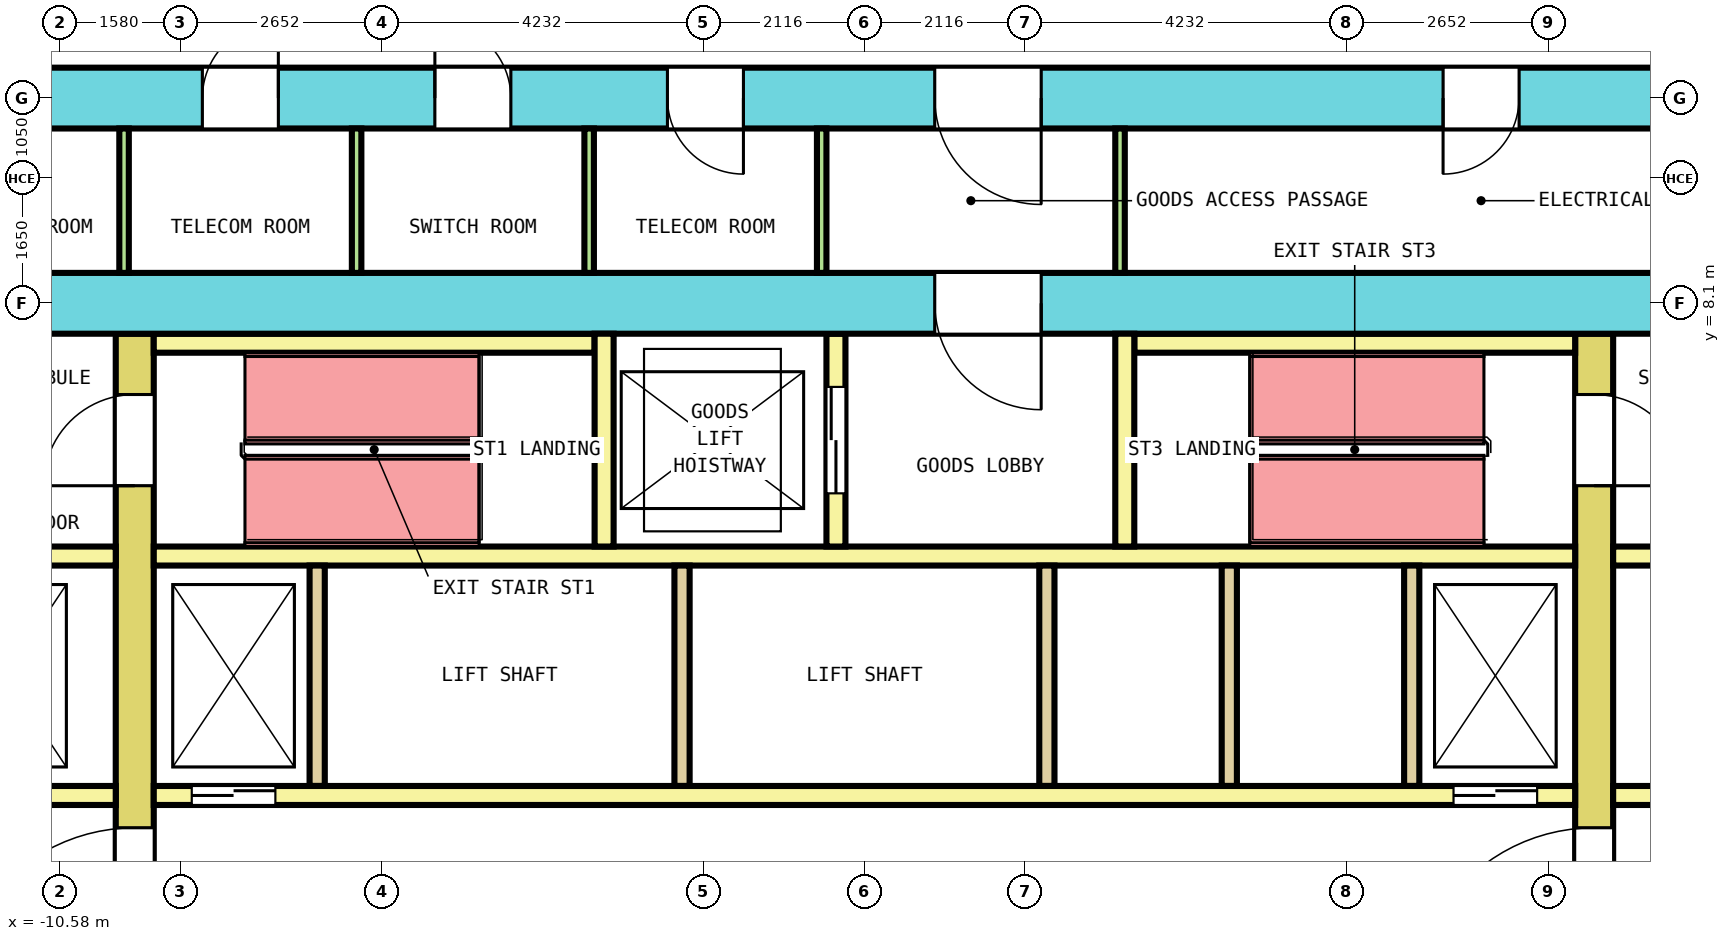
"""IFC4 building model, lengths in metres.
Left out: names, types, materials, properties, quantities, classifications, styles, units other than length and angle.
Written with IfcOpenShell. Run it as: python <this file> out.ifc"""

import sys

from ifc_helpers import new_model, si_unit, direction, frame, frame_2d, origin, place, context, subcontext, project, spatial, rectangle, extrude, element, fill, save


model = new_model("IFC4")
c1 = context("Model", 3, precision=1e-05, world=origin(), true_north=direction((0.0, 1.0)))
c2 = subcontext(c1, "Body", "Model", "MODEL_VIEW")
j1 = project(units=[si_unit("LENGTHUNIT", "METRE"), si_unit("PLANEANGLEUNIT", "RADIAN")], contexts=[c1])
p1 = place(None, origin())
s1 = spatial("IfcSite", under=j1, at=p1, CompositionType="ELEMENT")
p2 = place(p1, origin())
s2 = spatial("IfcBuilding", under=s1, at=p2, CompositionType="ELEMENT")
p3 = place(p2, frame((0.0, 0.0, 80.8)))
s3 = spatial("IfcBuildingStorey", under=s2, at=p3, CompositionType="ELEMENT", Elevation=80.8)
p4 = place(p3, frame((-13.6, 10.8, 0.0), z_axis=(0.0, 0.0, 1.0), x_axis=(1.0, 0.0, 0.0)))
e1 = element("IfcWall", 1, at=p4, inside=s3, PredefinedType="SHEAR", context=c2, shape_type="SweptSolid", body=[
    extrude(rectangle(XDim=27.2, YDim=0.8, at=frame_2d((13.6, 0.0))), origin(), (0.0, 0.0, 1.0), 4.1),
])
p5 = place(p4, frame((1.798, 0.0, 0.0)))
e2 = element("IfcOpeningElement", 2, at=p5, cuts=e1, PredefinedType="OPENING", context=c2, shape_type="SweptSolid", body=[
    extrude(rectangle(XDim=1.0, YDim=2.1, at=frame_2d((0.5, 1.05))), frame((0.0, 0.41, 0.0), z_axis=(0.0, -1.0, 0.0), x_axis=(1.0, 0.0, 0.0)), (0.0, 0.0, 1.0), 0.82),
])
p6 = place(p4, frame((4.889, 0.0, 0.0)))
e3 = element("IfcOpeningElement", 3, at=p6, cuts=e1, PredefinedType="OPENING", context=c2, shape_type="SweptSolid", body=[
    extrude(rectangle(XDim=1.0, YDim=2.1, at=frame_2d((0.5, 1.05))), frame((0.0, 0.41, 0.0), z_axis=(0.0, -1.0, 0.0), x_axis=(1.0, 0.0, 0.0)), (0.0, 0.0, 1.0), 0.82),
])
p7 = place(p4, frame((7.948, 0.0, 0.0)))
e4 = element("IfcOpeningElement", 4, at=p7, cuts=e1, PredefinedType="OPENING", context=c2, shape_type="SweptSolid", body=[
    extrude(rectangle(XDim=1.0, YDim=2.1, at=frame_2d((0.5, 1.05))), frame((0.0, 0.41, 0.0), z_axis=(0.0, -1.0, 0.0), x_axis=(1.0, 0.0, 0.0)), (0.0, 0.0, 1.0), 0.82),
])
p8 = place(p4, frame((11.008, 0.0, 0.0)))
e5 = element("IfcOpeningElement", 5, at=p8, cuts=e1, PredefinedType="OPENING", context=c2, shape_type="SweptSolid", body=[
    extrude(rectangle(XDim=1.0, YDim=2.1, at=frame_2d((0.5, 1.05))), frame((0.0, 0.41, 0.0), z_axis=(0.0, -1.0, 0.0), x_axis=(1.0, 0.0, 0.0)), (0.0, 0.0, 1.0), 0.82),
])
p9 = place(p4, frame((21.212, 0.0, 0.0)))
e6 = element("IfcOpeningElement", 6, at=p9, cuts=e1, PredefinedType="OPENING", context=c2, shape_type="SweptSolid", body=[
    extrude(rectangle(XDim=1.0, YDim=2.1, at=frame_2d((0.5, 1.05))), frame((0.0, 0.41, 0.0), z_axis=(0.0, -1.0, 0.0), x_axis=(1.0, 0.0, 0.0)), (0.0, 0.0, 1.0), 0.82),
])
p10 = place(p4, frame((14.525, 0.0, 0.0)))
e7 = element("IfcOpeningElement", 7, at=p10, cuts=e1, PredefinedType="OPENING", context=c2, shape_type="SweptSolid", body=[
    extrude(rectangle(XDim=1.4, YDim=2.1, at=frame_2d((0.7, 1.05))), frame((0.0, 0.41, 0.0), z_axis=(0.0, -1.0, 0.0), x_axis=(1.0, 0.0, 0.0)), (0.0, 0.0, 1.0), 0.82),
])
p11 = place(p3, frame((-12.8, 8.1, 0.0), z_axis=(0.0, 0.0, 1.0), x_axis=(1.0, 0.0, 0.0)))
e8 = element("IfcWall", 8, at=p11, inside=s3, PredefinedType="SHEAR", context=c2, shape_type="SweptSolid", body=[
    extrude(rectangle(XDim=25.6, YDim=0.8, at=frame_2d((12.8, 0.0))), origin(), (0.0, 0.0, 1.0), 4.1),
])
p12 = place(p11, frame((13.725, 0.0, 0.0)))
e9 = element("IfcOpeningElement", 9, at=p12, cuts=e8, PredefinedType="OPENING", context=c2, shape_type="SweptSolid", body=[
    extrude(rectangle(XDim=1.4, YDim=2.1, at=frame_2d((0.7, 1.05))), frame((0.0, 0.41, 0.0), z_axis=(0.0, -1.0, 0.0), x_axis=(1.0, 0.0, 0.0)), (0.0, 0.0, 1.0), 0.82),
])
p13 = place(p3, frame((-9.6, -7.7, 0.0), z_axis=(0.0, 0.0, 1.0), x_axis=(0.0, 1.0, 0.0)))
e10 = element("IfcWall", 10, at=p13, inside=s3, PredefinedType="SHEAR", context=c2, shape_type="SweptSolid", body=[
    extrude(rectangle(XDim=15.4, YDim=0.5, at=frame_2d((7.7, 0.0))), origin(), (0.0, 0.0, 1.0), 4.1),
])
p14 = place(p13, frame((6.5, 0.0, 0.0)))
e11 = element("IfcOpeningElement", 11, at=p14, cuts=e10, PredefinedType="OPENING", context=c2, shape_type="SweptSolid", body=[
    extrude(rectangle(XDim=2.4, YDim=2.1, at=frame_2d((1.2, 1.05))), frame((0.0, 0.26, 0.0), z_axis=(0.0, -1.0, 0.0), x_axis=(1.0, 0.0, 0.0)), (0.0, 0.0, 1.0), 0.52),
])
p15 = place(p13, frame((13.4, 0.0, 0.0)))
e12 = element("IfcOpeningElement", 12, at=p15, cuts=e10, PredefinedType="OPENING", context=c2, shape_type="SweptSolid", body=[
    extrude(rectangle(XDim=1.2, YDim=2.1, at=frame_2d((0.6, 1.05))), frame((0.0, 0.26, 0.0), z_axis=(0.0, -1.0, 0.0), x_axis=(1.0, 0.0, 0.0)), (0.0, 0.0, 1.0), 0.52),
])
p16 = place(p13, frame((0.8, 0.0, 0.0)))
e13 = element("IfcOpeningElement", 13, at=p16, cuts=e10, PredefinedType="OPENING", context=c2, shape_type="SweptSolid", body=[
    extrude(rectangle(XDim=1.2, YDim=2.1, at=frame_2d((0.6, 1.05))), frame((0.0, 0.26, 0.0), z_axis=(0.0, -1.0, 0.0), x_axis=(1.0, 0.0, 0.0)), (0.0, 0.0, 1.0), 0.52),
])
p17 = place(p3, frame((9.6, -7.7, 0.0), z_axis=(0.0, 0.0, 1.0), x_axis=(0.0, 1.0, 0.0)))
e14 = element("IfcWall", 14, at=p17, inside=s3, PredefinedType="SHEAR", context=c2, shape_type="SweptSolid", body=[
    extrude(rectangle(XDim=15.4, YDim=0.5, at=frame_2d((7.7, 0.0))), origin(), (0.0, 0.0, 1.0), 4.1),
])
p18 = place(p17, frame((6.5, 0.0, 0.0)))
e15 = element("IfcOpeningElement", 15, at=p18, cuts=e14, PredefinedType="OPENING", context=c2, shape_type="SweptSolid", body=[
    extrude(rectangle(XDim=2.4, YDim=2.1, at=frame_2d((1.2, 1.05))), frame((0.0, 0.26, 0.0), z_axis=(0.0, -1.0, 0.0), x_axis=(1.0, 0.0, 0.0)), (0.0, 0.0, 1.0), 0.52),
])
p19 = place(p17, frame((13.4, 0.0, 0.0)))
e16 = element("IfcOpeningElement", 16, at=p19, cuts=e14, PredefinedType="OPENING", context=c2, shape_type="SweptSolid", body=[
    extrude(rectangle(XDim=1.2, YDim=2.1, at=frame_2d((0.6, 1.05))), frame((0.0, 0.26, 0.0), z_axis=(0.0, -1.0, 0.0), x_axis=(1.0, 0.0, 0.0)), (0.0, 0.0, 1.0), 0.52),
])
p20 = place(p17, frame((0.9, 0.0, 0.0)))
e17 = element("IfcOpeningElement", 17, at=p20, cuts=e14, PredefinedType="OPENING", context=c2, shape_type="SweptSolid", body=[
    extrude(rectangle(XDim=1.0, YDim=2.1, at=frame_2d((0.5, 1.05))), frame((0.0, 0.26, 0.0), z_axis=(0.0, -1.0, 0.0), x_axis=(1.0, 0.0, 0.0)), (0.0, 0.0, 1.0), 0.52),
])
p21 = place(p3, frame((-12.8, 1.625, 0.0), z_axis=(0.0, 0.0, 1.0), x_axis=(1.0, 0.0, 0.0)))
e18 = element("IfcWall", 18, at=p21, inside=s3, PredefinedType="SOLIDWALL", context=c2, shape_type="SweptSolid", body=[
    extrude(rectangle(XDim=2.95, YDim=0.25, at=frame_2d((1.475, 0.0))), origin(), (0.0, 0.0, 1.0), 4.1),
])
p22 = place(p21, frame((0.925, 0.0, 0.0)))
e19 = element("IfcOpeningElement", 19, at=p22, cuts=e18, PredefinedType="OPENING", context=c2, shape_type="SweptSolid", body=[
    extrude(rectangle(XDim=1.1, YDim=2.1, at=frame_2d((0.55, 1.05))), frame((0.0, 0.135, 0.0), z_axis=(0.0, -1.0, 0.0), x_axis=(1.0, 0.0, 0.0)), (0.0, 0.0, 1.0), 0.27),
])
p23 = place(p3, frame((-9.35, 1.625, 0.0), z_axis=(0.0, 0.0, 1.0), x_axis=(1.0, 0.0, 0.0)))
e20 = element("IfcWall", 20, at=p23, inside=s3, PredefinedType="SOLIDWALL", context=c2, shape_type="SweptSolid", body=[
    extrude(rectangle(XDim=18.7, YDim=0.25, at=frame_2d((9.35, 0.0))), origin(), (0.0, 0.0, 1.0), 4.1),
])
p24 = place(p23, frame((0.5, 0.0, 0.0)))
e21 = element("IfcOpeningElement", 21, at=p24, cuts=e20, PredefinedType="OPENING", context=c2, shape_type="SweptSolid", body=[
    extrude(rectangle(XDim=1.1, YDim=2.1, at=frame_2d((0.55, 1.05))), frame((0.0, 0.135, 0.0), z_axis=(0.0, -1.0, 0.0), x_axis=(1.0, 0.0, 0.0)), (0.0, 0.0, 1.0), 0.27),
])
p25 = place(p23, frame((17.1, 0.0, 0.0)))
e22 = element("IfcOpeningElement", 22, at=p25, cuts=e20, PredefinedType="OPENING", context=c2, shape_type="SweptSolid", body=[
    extrude(rectangle(XDim=1.1, YDim=2.1, at=frame_2d((0.55, 1.05))), frame((0.0, 0.135, 0.0), z_axis=(0.0, -1.0, 0.0), x_axis=(1.0, 0.0, 0.0)), (0.0, 0.0, 1.0), 0.27),
])
p26 = place(p3, frame((9.85, 1.625, 0.0), z_axis=(0.0, 0.0, 1.0), x_axis=(1.0, 0.0, 0.0)))
e23 = element("IfcWall", 23, at=p26, inside=s3, PredefinedType="SOLIDWALL", context=c2, shape_type="SweptSolid", body=[
    extrude(rectangle(XDim=2.95, YDim=0.25, at=frame_2d((1.475, 0.0))), origin(), (0.0, 0.0, 1.0), 4.1),
])
p27 = place(p26, frame((0.925, 0.0, 0.0)))
e24 = element("IfcOpeningElement", 24, at=p27, cuts=e23, PredefinedType="OPENING", context=c2, shape_type="SweptSolid", body=[
    extrude(rectangle(XDim=1.1, YDim=2.1, at=frame_2d((0.55, 1.05))), frame((0.0, 0.135, 0.0), z_axis=(0.0, -1.0, 0.0), x_axis=(1.0, 0.0, 0.0)), (0.0, 0.0, 1.0), 0.27),
])
p28 = place(p3, frame((-12.8, 4.775, 0.0), z_axis=(0.0, 0.0, 1.0), x_axis=(1.0, 0.0, 0.0)))
e25 = element("IfcWall", 25, at=p28, inside=s3, PredefinedType="SOLIDWALL", context=c2, shape_type="SweptSolid", body=[
    extrude(rectangle(XDim=2.95, YDim=0.25, at=frame_2d((1.475, 0.0))), origin(), (0.0, 0.0, 1.0), 4.1),
])
p29 = place(p3, frame((-9.35, 4.775, 0.0), z_axis=(0.0, 0.0, 1.0), x_axis=(1.0, 0.0, 0.0)))
e26 = element("IfcWall", 26, at=p29, inside=s3, PredefinedType="SOLIDWALL", context=c2, shape_type="SweptSolid", body=[
    extrude(rectangle(XDim=18.7, YDim=0.25, at=frame_2d((9.35, 0.0))), origin(), (0.0, 0.0, 1.0), 4.1),
])
p30 = place(p3, frame((9.85, 4.775, 0.0), z_axis=(0.0, 0.0, 1.0), x_axis=(1.0, 0.0, 0.0)))
e27 = element("IfcWall", 27, at=p30, inside=s3, PredefinedType="SOLIDWALL", context=c2, shape_type="SweptSolid", body=[
    extrude(rectangle(XDim=2.95, YDim=0.25, at=frame_2d((1.475, 0.0))), origin(), (0.0, 0.0, 1.0), 4.1),
])
for number, where, z_axis, x_axis in (
    (28, (-7.2, 1.75, 0.0), (0.0, 0.0, 1.0), (0.0, 1.0, 0.0)),
    (29, (-2.4, 1.75, 0.0), (0.0, 0.0, 1.0), (0.0, 1.0, 0.0)),
    (30, (2.4, 1.75, 0.0), (0.0, 0.0, 1.0), (0.0, 1.0, 0.0)),
    (31, (4.8, 1.75, 0.0), (0.0, 0.0, 1.0), (0.0, 1.0, 0.0)),
    (32, (7.2, 1.75, 0.0), (0.0, 0.0, 1.0), (0.0, 1.0, 0.0)),
):
    element("IfcWall", number, at=place(p3, frame(where, z_axis=z_axis, x_axis=x_axis)), inside=s3, PredefinedType="SOLIDWALL", context=c2, shape_type="SweptSolid", body=[
        extrude(rectangle(XDim=2.9, YDim=0.2, at=frame_2d((1.45, 0.0))), origin(), (0.0, 0.0, 1.0), 4.1),
    ])
for number, where, z_axis, x_axis in (
    (33, (-9.35, 7.575, 0.0), (0.0, 0.0, 1.0), (1.0, 0.0, 0.0)),
    (34, (3.55, 7.575, 0.0), (0.0, 0.0, 1.0), (1.0, 0.0, 0.0)),
):
    element("IfcWall", number, at=place(p3, frame(where, z_axis=z_axis, x_axis=x_axis)), inside=s3, PredefinedType="SOLIDWALL", context=c2, shape_type="SweptSolid", body=[
        extrude(rectangle(XDim=5.8, YDim=0.25, at=frame_2d((2.9, 0.0))), origin(), (0.0, 0.0, 1.0), 4.1),
    ])
p31 = place(p3, frame((-3.425, 4.9, 0.0), z_axis=(0.0, 0.0, 1.0), x_axis=(0.0, 1.0, 0.0)))
e35 = element("IfcWall", 35, at=p31, inside=s3, PredefinedType="SOLIDWALL", context=c2, shape_type="SweptSolid", body=[
    extrude(rectangle(XDim=2.8, YDim=0.25, at=frame_2d((1.4, 0.0))), origin(), (0.0, 0.0, 1.0), 4.1),
])
p32 = place(p3, frame((-0.375, 4.9, 0.0), z_axis=(0.0, 0.0, 1.0), x_axis=(0.0, 1.0, 0.0)))
e36 = element("IfcWall", 36, at=p32, inside=s3, PredefinedType="SOLIDWALL", context=c2, shape_type="SweptSolid", body=[
    extrude(rectangle(XDim=2.8, YDim=0.25, at=frame_2d((1.4, 0.0))), origin(), (0.0, 0.0, 1.0), 4.1),
])
p33 = place(p32, frame((0.7, 0.0, 0.0)))
e37 = element("IfcOpeningElement", 37, at=p33, cuts=e36, PredefinedType="OPENING", context=c2, shape_type="SweptSolid", body=[
    extrude(rectangle(XDim=1.4, YDim=2.1, at=frame_2d((0.7, 1.05))), frame((0.0, 0.135, 0.0), z_axis=(0.0, -1.0, 0.0), x_axis=(1.0, 0.0, 0.0)), (0.0, 0.0, 1.0), 0.27),
])
p34 = place(p3, frame((3.425, 4.9, 0.0), z_axis=(0.0, 0.0, 1.0), x_axis=(0.0, 1.0, 0.0)))
e38 = element("IfcWall", 38, at=p34, inside=s3, PredefinedType="SOLIDWALL", context=c2, shape_type="SweptSolid", body=[
    extrude(rectangle(XDim=2.8, YDim=0.25, at=frame_2d((1.4, 0.0))), origin(), (0.0, 0.0, 1.0), 4.1),
])
for number, where, z_axis, x_axis in (
    (39, (-9.74, 8.5, 0.0), (0.0, 0.0, 1.0), (0.0, 1.0, 0.0)),
    (40, (-6.681, 8.5, 0.0), (0.0, 0.0, 1.0), (0.0, 1.0, 0.0)),
    (41, (-3.622, 8.5, 0.0), (0.0, 0.0, 1.0), (0.0, 1.0, 0.0)),
    (42, (-0.562, 8.5, 0.0), (0.0, 0.0, 1.0), (0.0, 1.0, 0.0)),
    (43, (3.363, 8.5, 0.0), (0.0, 0.0, 1.0), (0.0, 1.0, 0.0)),
):
    element("IfcWall", number, at=place(p3, frame(where, z_axis=z_axis, x_axis=x_axis)), inside=s3, PredefinedType="PARTITIONING", context=c2, shape_type="SweptSolid", body=[
        extrude(rectangle(XDim=1.9, YDim=0.125, at=frame_2d((0.95, 0.0))), origin(), (0.0, 0.0, 1.0), 4.1),
    ])
p35 = place(p24, origin())
e44 = element("IfcDoor", 44, at=p35, inside=s3, OperationType="DOUBLE_DOOR_SLIDING", PredefinedType="DOOR", context=c2, shape_type="SweptSolid", body=[
    extrude(rectangle(XDim=1.1, YDim=2.1, at=frame_2d((0.55, 1.05))), frame((0.0, 0.075, 0.0), z_axis=(0.0, -1.0, 0.0), x_axis=(1.0, 0.0, 0.0)), (0.0, 0.0, 1.0), 0.15),
])
fill(e21, e44)
p36 = place(p25, origin())
e45 = element("IfcDoor", 45, at=p36, inside=s3, OperationType="DOUBLE_DOOR_SLIDING", PredefinedType="DOOR", context=c2, shape_type="SweptSolid", body=[
    extrude(rectangle(XDim=1.1, YDim=2.1, at=frame_2d((0.55, 1.05))), frame((0.0, 0.075, 0.0), z_axis=(0.0, -1.0, 0.0), x_axis=(1.0, 0.0, 0.0)), (0.0, 0.0, 1.0), 0.15),
])
fill(e22, e45)
p37 = place(p33, origin())
e46 = element("IfcDoor", 46, at=p37, inside=s3, OperationType="DOUBLE_DOOR_SLIDING", PredefinedType="DOOR", context=c2, shape_type="SweptSolid", body=[
    extrude(rectangle(XDim=1.4, YDim=2.1, at=frame_2d((0.7, 1.05))), frame((0.0, 0.075, 0.0), z_axis=(0.0, -1.0, 0.0), x_axis=(1.0, 0.0, 0.0)), (0.0, 0.0, 1.0), 0.15),
])
fill(e37, e46)
p38 = place(p14, origin())
e47 = element("IfcDoor", 47, at=p38, inside=s3, OperationType="DOUBLE_DOOR_SINGLE_SWING", PredefinedType="DOOR", context=c2, shape_type="SweptSolid", body=[
    extrude(rectangle(XDim=2.4, YDim=2.1, at=frame_2d((1.2, 1.05))), frame((0.0, 0.2, 0.0), z_axis=(0.0, -1.0, 0.0), x_axis=(1.0, 0.0, 0.0)), (0.0, 0.0, 1.0), 0.4),
])
fill(e11, e47)
p39 = place(p18, origin())
e48 = element("IfcDoor", 48, at=p39, inside=s3, OperationType="DOUBLE_DOOR_SINGLE_SWING", PredefinedType="DOOR", context=c2, shape_type="SweptSolid", body=[
    extrude(rectangle(XDim=2.4, YDim=2.1, at=frame_2d((1.2, 1.05))), frame((0.0, 0.2, 0.0), z_axis=(0.0, -1.0, 0.0), x_axis=(1.0, 0.0, 0.0)), (0.0, 0.0, 1.0), 0.4),
])
fill(e15, e48)
p40 = place(p15, origin())
e49 = element("IfcDoor", 49, at=p40, inside=s3, OperationType="SINGLE_SWING_LEFT", PredefinedType="DOOR", context=c2, shape_type="SweptSolid", body=[
    extrude(rectangle(XDim=1.2, YDim=2.1, at=frame_2d((0.6, 1.05))), frame((0.0, 0.2, 0.0), z_axis=(0.0, -1.0, 0.0), x_axis=(1.0, 0.0, 0.0)), (0.0, 0.0, 1.0), 0.4),
])
fill(e12, e49)
p41 = place(p19, origin())
e50 = element("IfcDoor", 50, at=p41, inside=s3, OperationType="SINGLE_SWING_LEFT", PredefinedType="DOOR", context=c2, shape_type="SweptSolid", body=[
    extrude(rectangle(XDim=1.2, YDim=2.1, at=frame_2d((0.6, 1.05))), frame((0.0, 0.2, 0.0), z_axis=(0.0, -1.0, 0.0), x_axis=(1.0, 0.0, 0.0)), (0.0, 0.0, 1.0), 0.4),
])
fill(e16, e50)
p42 = place(p12, origin())
e51 = element("IfcDoor", 51, at=p42, inside=s3, OperationType="DOUBLE_DOOR_SINGLE_SWING", PredefinedType="DOOR", context=c2, shape_type="SweptSolid", body=[
    extrude(rectangle(XDim=1.4, YDim=2.1, at=frame_2d((0.7, 1.05))), frame((0.0, 0.3, 0.0), z_axis=(0.0, -1.0, 0.0), x_axis=(1.0, 0.0, 0.0)), (0.0, 0.0, 1.0), 0.6),
])
fill(e9, e51)
p43 = place(p6, origin())
e52 = element("IfcDoor", 52, at=p43, inside=s3, OperationType="SINGLE_SWING_LEFT", PredefinedType="DOOR", context=c2, shape_type="SweptSolid", body=[
    extrude(rectangle(XDim=1.0, YDim=2.1, at=frame_2d((0.5, 1.05))), frame((0.0, 0.3, 0.0), z_axis=(0.0, -1.0, 0.0), x_axis=(1.0, 0.0, 0.0)), (0.0, 0.0, 1.0), 0.6),
])
fill(e3, e52)
p44 = place(p7, origin())
e53 = element("IfcDoor", 53, at=p44, inside=s3, OperationType="SINGLE_SWING_RIGHT", PredefinedType="DOOR", context=c2, shape_type="SweptSolid", body=[
    extrude(rectangle(XDim=1.0, YDim=2.1, at=frame_2d((0.5, 1.05))), frame((0.0, 0.3, 0.0), z_axis=(0.0, -1.0, 0.0), x_axis=(1.0, 0.0, 0.0)), (0.0, 0.0, 1.0), 0.6),
])
fill(e4, e53)
p45 = place(p8, origin())
e54 = element("IfcDoor", 54, at=p45, inside=s3, OperationType="SINGLE_SWING_LEFT", PredefinedType="DOOR", context=c2, shape_type="SweptSolid", body=[
    extrude(rectangle(XDim=1.0, YDim=2.1, at=frame_2d((0.5, 1.05))), frame((0.0, 0.3, 0.0), z_axis=(0.0, -1.0, 0.0), x_axis=(1.0, 0.0, 0.0)), (0.0, 0.0, 1.0), 0.6),
])
fill(e5, e54)
p46 = place(p9, origin())
e55 = element("IfcDoor", 55, at=p46, inside=s3, OperationType="SINGLE_SWING_RIGHT", PredefinedType="DOOR", context=c2, shape_type="SweptSolid", body=[
    extrude(rectangle(XDim=1.0, YDim=2.1, at=frame_2d((0.5, 1.05))), frame((0.0, 0.3, 0.0), z_axis=(0.0, -1.0, 0.0), x_axis=(1.0, 0.0, 0.0)), (0.0, 0.0, 1.0), 0.6),
])
fill(e6, e55)
p47 = place(p10, origin())
e56 = element("IfcDoor", 56, at=p47, inside=s3, OperationType="DOUBLE_DOOR_SINGLE_SWING", PredefinedType="DOOR", context=c2, shape_type="SweptSolid", body=[
    extrude(rectangle(XDim=1.4, YDim=2.1, at=frame_2d((0.7, 1.05))), frame((0.0, 0.3, 0.0), z_axis=(0.0, -1.0, 0.0), x_axis=(1.0, 0.0, 0.0)), (0.0, 0.0, 1.0), 0.6),
])
fill(e7, e56)
save(model, sys.argv[1])
